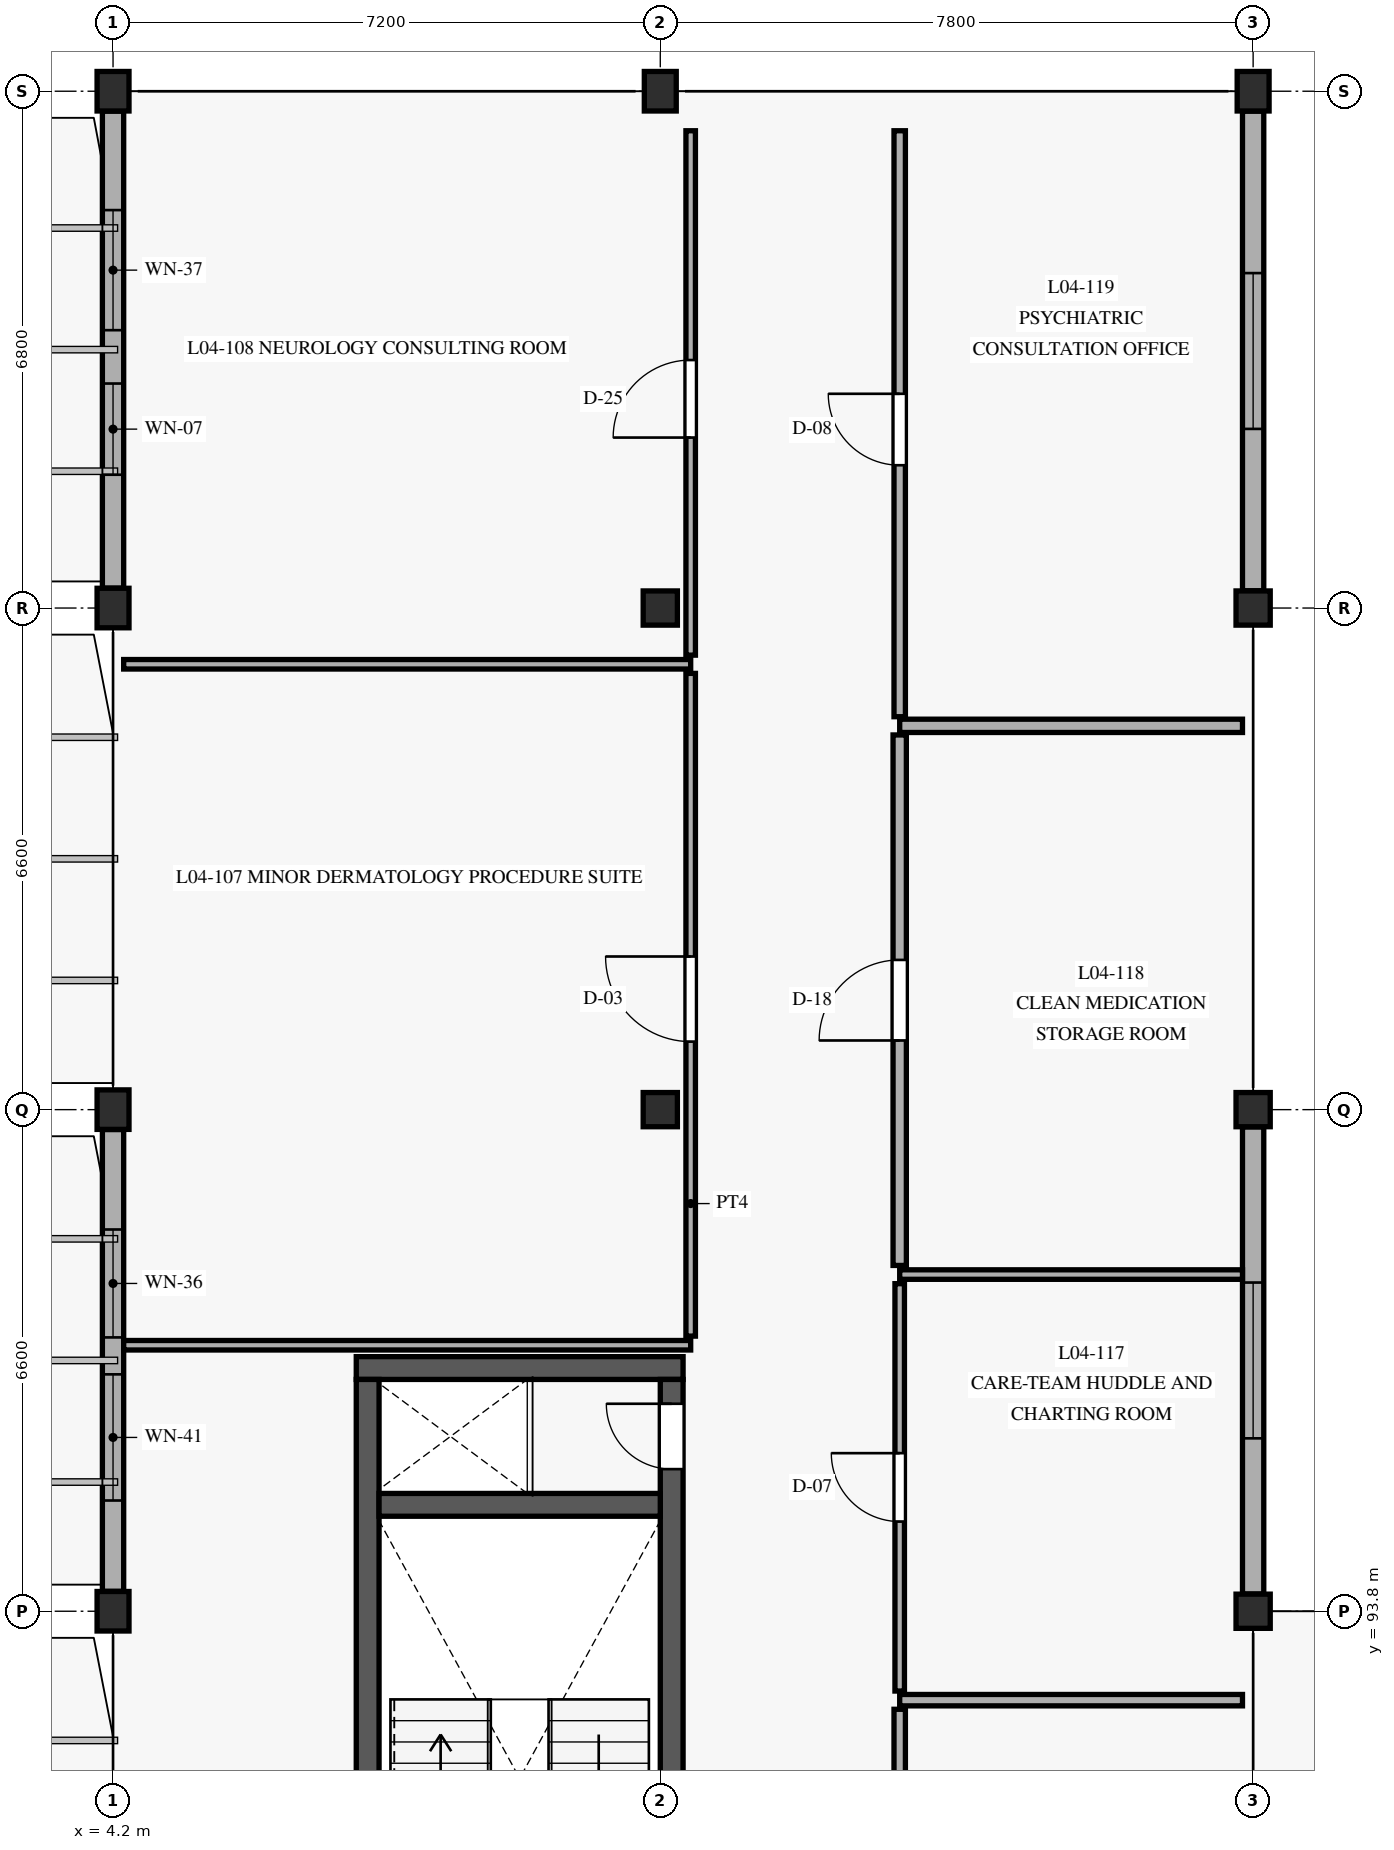
"""IFC4 building model, lengths in metres.
Left out: names, types, materials, properties, quantities, classifications, styles, units other than length and angle.
Written with IfcOpenShell. Run it as: python <this file> out.ifc"""

import sys

from ifc_helpers import new_model, si_unit, direction, frame, frame_2d, origin, origin_with_axes, origin_2d, place, context, subcontext, project, spatial, rectangle, extrude, element, fill, save


model = new_model("IFC4")
c1 = context("Model", 3, precision=1e-05, world=origin(), true_north=direction((0.0, 1.0)))
c2 = subcontext(c1, "Body", "Model", "MODEL_VIEW")
j1 = project(units=[si_unit("LENGTHUNIT", "METRE"), si_unit("PLANEANGLEUNIT", "RADIAN")], contexts=[c1])
p1 = place(None, origin())
s1 = spatial("IfcSite", under=j1, at=p1, CompositionType="ELEMENT")
p2 = place(p1, origin())
s2 = spatial("IfcBuilding", under=s1, at=p2, CompositionType="ELEMENT")
p3 = place(p2, frame((0.0, 0.0, 13.5)))
s3 = spatial("IfcBuildingStorey", under=s2, at=p3, CompositionType="ELEMENT", Elevation=13.5)
for number, where, z_axis, x_axis in (
    (1, (4.2, 93.8, 0.0), (0.0, 0.0, 1.0), (1.0, 0.0, 0.0)),
    (2, (4.2, 100.4, 0.0), (0.0, 0.0, 1.0), (1.0, 0.0, 0.0)),
    (3, (4.2, 107.0, 0.0), (0.0, 0.0, 1.0), (1.0, 0.0, 0.0)),
    (4, (4.2, 113.8, 0.0), (0.0, 0.0, 1.0), (1.0, 0.0, 0.0)),
):
    element("IfcColumn", number, at=place(p3, frame(where, z_axis=z_axis, x_axis=x_axis)), inside=s3, PredefinedType="COLUMN", context=c2, shape_type="SweptSolid", body=[
        extrude(rectangle(XDim=0.42, YDim=0.52, at=origin_2d()), origin(), (0.0, 0.0, 1.0), 4.05),
    ])
for number, where, z_axis, x_axis in (
    (5, (11.4, 100.4, 0.0), (0.0, 0.0, 1.0), (1.0, 0.0, 0.0)),
    (6, (11.4, 107.0, 0.0), (0.0, 0.0, 1.0), (1.0, 0.0, 0.0)),
):
    element("IfcColumn", number, at=place(p3, frame(where, z_axis=z_axis, x_axis=x_axis)), inside=s3, PredefinedType="COLUMN", context=c2, shape_type="SweptSolid", body=[
        extrude(rectangle(XDim=0.45, YDim=0.45, at=origin_2d()), origin(), (0.0, 0.0, 1.0), 4.05),
    ])
p4 = place(p3, frame((11.4, 113.8, 0.0), z_axis=(0.0, 0.0, 1.0), x_axis=(1.0, 0.0, 0.0)))
e7 = element("IfcColumn", 7, at=p4, inside=s3, PredefinedType="COLUMN", context=c2, shape_type="SweptSolid", body=[
    extrude(rectangle(XDim=0.42, YDim=0.52, at=origin_2d()), origin(), (0.0, 0.0, 1.0), 4.05),
])
for number, where, z_axis, x_axis in (
    (8, (19.2, 93.8, 0.0), (0.0, 0.0, 1.0), (1.0, 0.0, 0.0)),
    (9, (19.2, 100.4, 0.0), (0.0, 0.0, 1.0), (1.0, 0.0, 0.0)),
    (10, (19.2, 107.0, 0.0), (0.0, 0.0, 1.0), (1.0, 0.0, 0.0)),
):
    element("IfcColumn", number, at=place(p3, frame(where, z_axis=z_axis, x_axis=x_axis)), inside=s3, PredefinedType="COLUMN", context=c2, shape_type="SweptSolid", body=[
        extrude(rectangle(XDim=0.45, YDim=0.45, at=origin_2d()), origin(), (0.0, 0.0, 1.0), 4.05),
    ])
p5 = place(p3, frame((19.2, 113.8, 0.0), z_axis=(0.0, 0.0, 1.0), x_axis=(1.0, 0.0, 0.0)))
e11 = element("IfcColumn", 11, at=p5, inside=s3, PredefinedType="COLUMN", context=c2, shape_type="SweptSolid", body=[
    extrude(rectangle(XDim=0.42, YDim=0.52, at=origin_2d()), origin(), (0.0, 0.0, 1.0), 4.05),
])
p6 = place(p3, frame((11.7, 97.0, 0.0), z_axis=(0.0, 0.0, 1.0), x_axis=(-1.0, 0.0, 0.0)))
e12 = element("IfcWall", 12, at=p6, inside=s3, PredefinedType="SHEAR", context=c2, shape_type="SweptSolid", body=[
    extrude(rectangle(XDim=4.3, YDim=0.3, at=frame_2d((2.15, 0.0))), origin(), (0.0, 0.0, 1.0), 3.75),
])
p7 = place(p3, frame((7.55, 96.85, 0.0), z_axis=(0.0, 0.0, 1.0), x_axis=(0.0, -1.0, 0.0)))
e13 = element("IfcWall", 13, at=p7, inside=s3, PredefinedType="SHEAR", context=c2, shape_type="SweptSolid", body=[
    extrude(rectangle(XDim=8.7, YDim=0.3, at=frame_2d((4.35, 0.0))), origin(), (0.0, 0.0, 1.0), 3.75),
])
p8 = place(p3, frame((11.55, 88.15, 0.0), z_axis=(0.0, 0.0, 1.0), x_axis=(0.0, 1.0, 0.0)))
e14 = element("IfcWall", 14, at=p8, inside=s3, PredefinedType="SHEAR", context=c2, shape_type="SweptSolid", body=[
    extrude(rectangle(XDim=8.7, YDim=0.3, at=frame_2d((4.35, 0.0))), origin(), (0.0, 0.0, 1.0), 3.75),
])
p9 = place(p8, frame((0.2, 0.0, 0.0)))
e15 = element("IfcOpeningElement", 15, at=p9, cuts=e14, PredefinedType="OPENING", context=c2, shape_type="SweptSolid", body=[
    extrude(rectangle(XDim=1.1, YDim=2.2, at=frame_2d((0.55, 1.1))), frame((0.0, 0.16, 0.0), z_axis=(0.0, -1.0, 0.0), x_axis=(1.0, 0.0, 0.0)), (0.0, 0.0, 1.0), 0.32),
])
p10 = place(p8, frame((7.52, 0.0, 0.0)))
e16 = element("IfcOpeningElement", 16, at=p10, cuts=e14, PredefinedType="OPENING", context=c2, shape_type="SweptSolid", body=[
    extrude(rectangle(XDim=0.86, YDim=2.05, at=frame_2d((0.43, 1.025))), frame((0.0, 0.16, 0.0), z_axis=(0.0, -1.0, 0.0), x_axis=(1.0, 0.0, 0.0)), (0.0, 0.0, 1.0), 0.32),
])
p11 = place(p3, frame((7.7, 95.2, 0.0), z_axis=(0.0, 0.0, 1.0), x_axis=(1.0, 0.0, 0.0)))
e17 = element("IfcWall", 17, at=p11, inside=s3, PredefinedType="SHEAR", context=c2, shape_type="SweptSolid", body=[
    extrude(rectangle(XDim=3.7, YDim=0.3, at=frame_2d((1.85, 0.0))), origin(), (0.0, 0.0, 1.0), 3.75),
])
p12 = place(p3, frame((4.2, 100.138, 0.0), z_axis=(0.0, 0.0, 1.0), x_axis=(0.0, -1.0, 0.0)))
e18 = element("IfcWall", 18, at=p12, inside=s3, PredefinedType="SOLIDWALL", context=c2, shape_type="SweptSolid", body=[
    extrude(rectangle(XDim=6.076, YDim=0.28, at=frame_2d((3.038, 0.0))), origin(), (0.0, 0.0, 1.0), 3.33),
])
p13 = place(p12, frame((1.315, 0.0, 0.88)))
e19 = element("IfcOpeningElement", 19, at=p13, cuts=e18, PredefinedType="OPENING", context=c2, shape_type="SweptSolid", body=[
    extrude(rectangle(XDim=1.42, YDim=1.9, at=frame_2d((0.71, 0.95))), frame((0.0, 0.15, 0.0), z_axis=(0.0, -1.0, 0.0), x_axis=(1.0, 0.0, 0.0)), (0.0, 0.0, 1.0), 0.3),
])
p14 = place(p12, frame((3.221, 0.0, 0.88)))
e20 = element("IfcOpeningElement", 20, at=p14, cuts=e18, PredefinedType="OPENING", context=c2, shape_type="SweptSolid", body=[
    extrude(rectangle(XDim=1.66, YDim=2.15, at=frame_2d((0.83, 1.075))), frame((0.0, 0.15, 0.0), z_axis=(0.0, -1.0, 0.0), x_axis=(1.0, 0.0, 0.0)), (0.0, 0.0, 1.0), 0.3),
])
p15 = place(p3, frame((4.2, 113.538, 0.0), z_axis=(0.0, 0.0, 1.0), x_axis=(0.0, -1.0, 0.0)))
e21 = element("IfcWall", 21, at=p15, inside=s3, PredefinedType="SOLIDWALL", context=c2, shape_type="SweptSolid", body=[
    extrude(rectangle(XDim=6.276, YDim=0.28, at=frame_2d((3.138, 0.0))), origin(), (0.0, 0.0, 1.0), 3.33),
])
p16 = place(p15, frame((1.302, 0.0, 0.88)))
e22 = element("IfcOpeningElement", 22, at=p16, cuts=e21, PredefinedType="OPENING", context=c2, shape_type="SweptSolid", body=[
    extrude(rectangle(XDim=1.58, YDim=1.9, at=frame_2d((0.79, 0.95))), frame((0.0, 0.15, 0.0), z_axis=(0.0, -1.0, 0.0), x_axis=(1.0, 0.0, 0.0)), (0.0, 0.0, 1.0), 0.3),
])
p17 = place(p15, frame((3.584, 0.0, 0.88)))
e23 = element("IfcOpeningElement", 23, at=p17, cuts=e21, PredefinedType="OPENING", context=c2, shape_type="SweptSolid", body=[
    extrude(rectangle(XDim=1.2, YDim=1.85, at=frame_2d((0.6, 0.925))), frame((0.0, 0.15, 0.0), z_axis=(0.0, -1.0, 0.0), x_axis=(1.0, 0.0, 0.0)), (0.0, 0.0, 1.0), 0.3),
])
p18 = place(p3, frame((19.2, 94.027, 0.0), z_axis=(0.0, 0.0, 1.0), x_axis=(0.0, 1.0, 0.0)))
e24 = element("IfcWall", 24, at=p18, inside=s3, PredefinedType="SOLIDWALL", context=c2, shape_type="SweptSolid", body=[
    extrude(rectangle(XDim=6.146, YDim=0.28, at=frame_2d((3.073, 0.0))), origin(), (0.0, 0.0, 1.0), 3.42),
])
p19 = place(p18, frame((2.048, 0.0, 0.8)))
e25 = element("IfcOpeningElement", 25, at=p19, cuts=e24, PredefinedType="OPENING", context=c2, shape_type="SweptSolid", body=[
    extrude(rectangle(XDim=2.05, YDim=1.95, at=frame_2d((1.025, 0.975))), frame((0.0, 0.15, 0.0), z_axis=(0.0, -1.0, 0.0), x_axis=(1.0, 0.0, 0.0)), (0.0, 0.0, 1.0), 0.3),
])
p20 = place(p3, frame((19.2, 107.227, 0.0), z_axis=(0.0, 0.0, 1.0), x_axis=(0.0, 1.0, 0.0)))
e26 = element("IfcWall", 26, at=p20, inside=s3, PredefinedType="SOLIDWALL", context=c2, shape_type="SweptSolid", body=[
    extrude(rectangle(XDim=6.311, YDim=0.28, at=frame_2d((3.156, 0.0))), origin(), (0.0, 0.0, 1.0), 3.42),
])
p21 = place(p20, frame((2.13, 0.0, 0.8)))
e27 = element("IfcOpeningElement", 27, at=p21, cuts=e26, PredefinedType="OPENING", context=c2, shape_type="SweptSolid", body=[
    extrude(rectangle(XDim=2.05, YDim=1.95, at=frame_2d((1.025, 0.975))), frame((0.0, 0.15, 0.0), z_axis=(0.0, -1.0, 0.0), x_axis=(1.0, 0.0, 0.0)), (0.0, 0.0, 1.0), 0.3),
])
p22 = place(p3, frame((11.8, 97.42, 0.0), z_axis=(0.0, 0.0, 1.0), x_axis=(0.0, 1.0, 0.0)))
e28 = element("IfcWall", 28, at=p22, inside=s3, PredefinedType="PARTITIONING", context=c2, shape_type="SweptSolid", body=[
    extrude(rectangle(XDim=8.72, YDim=0.125, at=frame_2d((4.36, 0.0))), origin(), (0.0, 0.0, 1.0), 3.345),
])
p23 = place(p22, frame((3.875, 0.0, 0.0)))
e29 = element("IfcOpeningElement", 29, at=p23, cuts=e28, PredefinedType="OPENING", context=c2, shape_type="SweptSolid", body=[
    extrude(rectangle(XDim=1.12, YDim=2.2, at=frame_2d((0.56, 1.1))), frame((0.0, 0.073, 0.0), z_axis=(0.0, -1.0, 0.0), x_axis=(1.0, 0.0, 0.0)), (0.0, 0.0, 1.0), 0.145),
])
for number, where, z_axis, x_axis in (
    (30, (4.34, 106.26, 0.0), (0.0, 0.0, 1.0), (1.0, 0.0, 0.0)),
    (31, (4.34, 97.3, 0.0), (0.0, 0.0, 1.0), (1.0, 0.0, 0.0)),
):
    element("IfcWall", number, at=place(p3, frame(where, z_axis=z_axis, x_axis=x_axis)), inside=s3, PredefinedType="PARTITIONING", context=c2, shape_type="SweptSolid", body=[
        extrude(rectangle(XDim=7.46, YDim=0.125, at=frame_2d((3.73, 0.0))), origin(), (0.0, 0.0, 1.0), 3.325),
    ])
p24 = place(p3, frame((11.8, 106.38, 0.0), z_axis=(0.0, 0.0, 1.0), x_axis=(0.0, 1.0, 0.0)))
e32 = element("IfcWall", 32, at=p24, inside=s3, PredefinedType="PARTITIONING", context=c2, shape_type="SweptSolid", body=[
    extrude(rectangle(XDim=6.9, YDim=0.125, at=frame_2d((3.45, 0.0))), origin(), (0.0, 0.0, 1.0), 3.345),
])
p25 = place(p24, frame((2.863, 0.0, 0.0)))
e33 = element("IfcOpeningElement", 33, at=p25, cuts=e32, PredefinedType="OPENING", context=c2, shape_type="SweptSolid", body=[
    extrude(rectangle(XDim=1.02, YDim=2.18, at=frame_2d((0.51, 1.09))), frame((0.0, 0.073, 0.0), z_axis=(0.0, -1.0, 0.0), x_axis=(1.0, 0.0, 0.0)), (0.0, 0.0, 1.0), 0.145),
])
p26 = place(p3, frame((14.55, 85.8, 0.0), z_axis=(0.0, 0.0, 1.0), x_axis=(0.0, 1.0, 0.0)))
e34 = element("IfcWall", 34, at=p26, inside=s3, PredefinedType="PARTITIONING", context=c2, shape_type="SweptSolid", body=[
    extrude(rectangle(XDim=6.71, YDim=0.15, at=frame_2d((3.355, 0.0))), origin(), (0.0, 0.0, 1.0), 3.345),
])
p27 = place(p26, frame((2.81, 0.0, 0.0)))
e35 = element("IfcOpeningElement", 35, at=p27, cuts=e34, PredefinedType="OPENING", context=c2, shape_type="SweptSolid", body=[
    extrude(rectangle(XDim=0.94, YDim=2.18, at=frame_2d((0.47, 1.09))), frame((0.0, 0.085, 0.0), z_axis=(0.0, -1.0, 0.0), x_axis=(1.0, 0.0, 0.0)), (0.0, 0.0, 1.0), 0.17),
])
p28 = place(p3, frame((14.55, 92.63, 0.0), z_axis=(0.0, 0.0, 1.0), x_axis=(1.0, 0.0, 0.0)))
e36 = element("IfcWall", 36, at=p28, inside=s3, PredefinedType="PARTITIONING", context=c2, shape_type="SweptSolid", body=[
    extrude(rectangle(XDim=4.51, YDim=0.15, at=frame_2d((2.255, 0.0))), origin(), (0.0, 0.0, 1.0), 3.415),
])
p29 = place(p3, frame((14.55, 92.75, 0.0), z_axis=(0.0, 0.0, 1.0), x_axis=(0.0, 1.0, 0.0)))
e37 = element("IfcWall", 37, at=p29, inside=s3, PredefinedType="PARTITIONING", context=c2, shape_type="SweptSolid", body=[
    extrude(rectangle(XDim=5.36, YDim=0.125, at=frame_2d((2.68, 0.0))), origin(), (0.0, 0.0, 1.0), 3.345),
])
p30 = place(p29, frame((2.23, 0.0, 0.0)))
e38 = element("IfcOpeningElement", 38, at=p30, cuts=e37, PredefinedType="OPENING", context=c2, shape_type="SweptSolid", body=[
    extrude(rectangle(XDim=0.9, YDim=2.12, at=frame_2d((0.45, 1.06))), frame((0.0, 0.073, 0.0), z_axis=(0.0, -1.0, 0.0), x_axis=(1.0, 0.0, 0.0)), (0.0, 0.0, 1.0), 0.145),
])
p31 = place(p3, frame((14.55, 98.23, 0.0), z_axis=(0.0, 0.0, 1.0), x_axis=(1.0, 0.0, 0.0)))
e39 = element("IfcWall", 39, at=p31, inside=s3, PredefinedType="PARTITIONING", context=c2, shape_type="SweptSolid", body=[
    extrude(rectangle(XDim=4.51, YDim=0.125, at=frame_2d((2.255, 0.0))), origin(), (0.0, 0.0, 1.0), 3.415),
])
p32 = place(p3, frame((14.55, 98.35, 0.0), z_axis=(0.0, 0.0, 1.0), x_axis=(0.0, 1.0, 0.0)))
e40 = element("IfcWall", 40, at=p32, inside=s3, PredefinedType="PARTITIONING", context=c2, shape_type="SweptSolid", body=[
    extrude(rectangle(XDim=6.98, YDim=0.175, at=frame_2d((3.49, 0.0))), origin(), (0.0, 0.0, 1.0), 3.345),
])
p33 = place(p32, frame((2.96, 0.0, 0.0)))
e41 = element("IfcOpeningElement", 41, at=p33, cuts=e40, PredefinedType="OPENING", context=c2, shape_type="SweptSolid", body=[
    extrude(rectangle(XDim=1.06, YDim=2.2, at=frame_2d((0.53, 1.1))), frame((0.0, 0.098, 0.0), z_axis=(0.0, -1.0, 0.0), x_axis=(1.0, 0.0, 0.0)), (0.0, 0.0, 1.0), 0.195),
])
p34 = place(p3, frame((14.55, 105.45, 0.0), z_axis=(0.0, 0.0, 1.0), x_axis=(1.0, 0.0, 0.0)))
e42 = element("IfcWall", 42, at=p34, inside=s3, PredefinedType="PARTITIONING", context=c2, shape_type="SweptSolid", body=[
    extrude(rectangle(XDim=4.51, YDim=0.175, at=frame_2d((2.255, 0.0))), origin(), (0.0, 0.0, 1.0), 3.415),
])
p35 = place(p3, frame((14.55, 105.57, 0.0), z_axis=(0.0, 0.0, 1.0), x_axis=(0.0, 1.0, 0.0)))
e43 = element("IfcWall", 43, at=p35, inside=s3, PredefinedType="PARTITIONING", context=c2, shape_type="SweptSolid", body=[
    extrude(rectangle(XDim=7.71, YDim=0.15, at=frame_2d((3.855, 0.0))), origin(), (0.0, 0.0, 1.0), 3.345),
])
p36 = place(p35, frame((3.309, 0.0, 0.0)))
e44 = element("IfcOpeningElement", 44, at=p36, cuts=e43, PredefinedType="OPENING", context=c2, shape_type="SweptSolid", body=[
    extrude(rectangle(XDim=0.94, YDim=2.18, at=frame_2d((0.47, 1.09))), frame((0.0, 0.085, 0.0), z_axis=(0.0, -1.0, 0.0), x_axis=(1.0, 0.0, 0.0)), (0.0, 0.0, 1.0), 0.17),
])
p37 = place(p10, origin_with_axes())
e45 = element("IfcDoor", 45, at=p37, inside=s3, OperationType="SINGLE_SWING_RIGHT", PredefinedType="DOOR", context=c2, shape_type="SweptSolid", body=[
    extrude(rectangle(XDim=0.86, YDim=2.05, at=frame_2d((0.43, 1.025))), frame((0.0, 0.025, 0.0), z_axis=(0.0, -1.0, 0.0), x_axis=(1.0, 0.0, 0.0)), (0.0, 0.0, 1.0), 0.05),
])
fill(e16, e45)
p38 = place(p13, origin_with_axes())
e46 = element("IfcWindow", 46, at=p38, inside=s3, PartitioningType="SINGLE_PANEL", PredefinedType="WINDOW", context=c2, shape_type="SweptSolid", body=[
    extrude(rectangle(XDim=1.42, YDim=1.9, at=frame_2d((0.71, 0.95))), frame((0.0, 0.03, 0.0), z_axis=(0.0, -1.0, 0.0), x_axis=(1.0, 0.0, 0.0)), (0.0, 0.0, 1.0), 0.06),
])
fill(e19, e46)
p39 = place(p14, origin_with_axes())
e47 = element("IfcWindow", 47, at=p39, inside=s3, PartitioningType="SINGLE_PANEL", PredefinedType="WINDOW", context=c2, shape_type="SweptSolid", body=[
    extrude(rectangle(XDim=1.66, YDim=2.15, at=frame_2d((0.83, 1.075))), frame((0.0, 0.03, 0.0), z_axis=(0.0, -1.0, 0.0), x_axis=(1.0, 0.0, 0.0)), (0.0, 0.0, 1.0), 0.06),
])
fill(e20, e47)
p40 = place(p16, origin_with_axes())
e48 = element("IfcWindow", 48, at=p40, inside=s3, PartitioningType="SINGLE_PANEL", PredefinedType="WINDOW", context=c2, shape_type="SweptSolid", body=[
    extrude(rectangle(XDim=1.58, YDim=1.9, at=frame_2d((0.79, 0.95))), frame((0.0, 0.03, 0.0), z_axis=(0.0, -1.0, 0.0), x_axis=(1.0, 0.0, 0.0)), (0.0, 0.0, 1.0), 0.06),
])
fill(e22, e48)
p41 = place(p17, origin_with_axes())
e49 = element("IfcWindow", 49, at=p41, inside=s3, PartitioningType="SINGLE_PANEL", PredefinedType="WINDOW", context=c2, shape_type="SweptSolid", body=[
    extrude(rectangle(XDim=1.2, YDim=1.85, at=frame_2d((0.6, 0.925))), frame((0.0, 0.03, 0.0), z_axis=(0.0, -1.0, 0.0), x_axis=(1.0, 0.0, 0.0)), (0.0, 0.0, 1.0), 0.06),
])
fill(e23, e49)
p42 = place(p19, origin_with_axes())
e50 = element("IfcWindow", 50, at=p42, inside=s3, PartitioningType="SINGLE_PANEL", PredefinedType="WINDOW", context=c2, shape_type="SweptSolid", body=[
    extrude(rectangle(XDim=2.05, YDim=1.95, at=frame_2d((1.025, 0.975))), frame((0.0, 0.03, 0.0), z_axis=(0.0, -1.0, 0.0), x_axis=(1.0, 0.0, 0.0)), (0.0, 0.0, 1.0), 0.06),
])
fill(e25, e50)
p43 = place(p21, origin_with_axes())
e51 = element("IfcWindow", 51, at=p43, inside=s3, PartitioningType="SINGLE_PANEL", PredefinedType="WINDOW", context=c2, shape_type="SweptSolid", body=[
    extrude(rectangle(XDim=2.05, YDim=1.95, at=frame_2d((1.025, 0.975))), frame((0.0, 0.03, 0.0), z_axis=(0.0, -1.0, 0.0), x_axis=(1.0, 0.0, 0.0)), (0.0, 0.0, 1.0), 0.06),
])
fill(e27, e51)
p44 = place(p23, origin_with_axes())
e52 = element("IfcDoor", 52, at=p44, inside=s3, OperationType="SINGLE_SWING_RIGHT", PredefinedType="DOOR", context=c2, shape_type="SweptSolid", body=[
    extrude(rectangle(XDim=1.12, YDim=2.2, at=frame_2d((0.56, 1.1))), frame((0.0, 0.025, 0.0), z_axis=(0.0, -1.0, 0.0), x_axis=(1.0, 0.0, 0.0)), (0.0, 0.0, 1.0), 0.05),
])
fill(e29, e52)
p45 = place(p25, origin_with_axes())
e53 = element("IfcDoor", 53, at=p45, inside=s3, OperationType="SINGLE_SWING_LEFT", PredefinedType="DOOR", context=c2, shape_type="SweptSolid", body=[
    extrude(rectangle(XDim=1.02, YDim=2.18, at=frame_2d((0.51, 1.09))), frame((0.0, 0.025, 0.0), z_axis=(0.0, -1.0, 0.0), x_axis=(1.0, 0.0, 0.0)), (0.0, 0.0, 1.0), 0.05),
])
fill(e33, e53)
p46 = place(p30, frame((0.9, 0.0, 0.0), z_axis=(0.0, 0.0, 1.0), x_axis=(-1.0, 0.0, 0.0)))
e54 = element("IfcDoor", 54, at=p46, inside=s3, OperationType="SINGLE_SWING_LEFT", PredefinedType="DOOR", context=c2, shape_type="SweptSolid", body=[
    extrude(rectangle(XDim=0.9, YDim=2.12, at=frame_2d((0.45, 1.06))), frame((0.0, 0.025, 0.0), z_axis=(0.0, -1.0, 0.0), x_axis=(1.0, 0.0, 0.0)), (0.0, 0.0, 1.0), 0.05),
])
fill(e38, e54)
p47 = place(p33, frame((1.06, 0.0, 0.0), z_axis=(0.0, 0.0, 1.0), x_axis=(-1.0, 0.0, 0.0)))
e55 = element("IfcDoor", 55, at=p47, inside=s3, OperationType="SINGLE_SWING_RIGHT", PredefinedType="DOOR", context=c2, shape_type="SweptSolid", body=[
    extrude(rectangle(XDim=1.06, YDim=2.2, at=frame_2d((0.53, 1.1))), frame((0.0, 0.025, 0.0), z_axis=(0.0, -1.0, 0.0), x_axis=(1.0, 0.0, 0.0)), (0.0, 0.0, 1.0), 0.05),
])
fill(e41, e55)
p48 = place(p36, frame((0.94, 0.0, 0.0), z_axis=(0.0, 0.0, 1.0), x_axis=(-1.0, 0.0, 0.0)))
e56 = element("IfcDoor", 56, at=p48, inside=s3, OperationType="SINGLE_SWING_LEFT", PredefinedType="DOOR", context=c2, shape_type="SweptSolid", body=[
    extrude(rectangle(XDim=0.94, YDim=2.18, at=frame_2d((0.47, 1.09))), frame((0.0, 0.025, 0.0), z_axis=(0.0, -1.0, 0.0), x_axis=(1.0, 0.0, 0.0)), (0.0, 0.0, 1.0), 0.05),
])
fill(e44, e56)
save(model, sys.argv[1])
